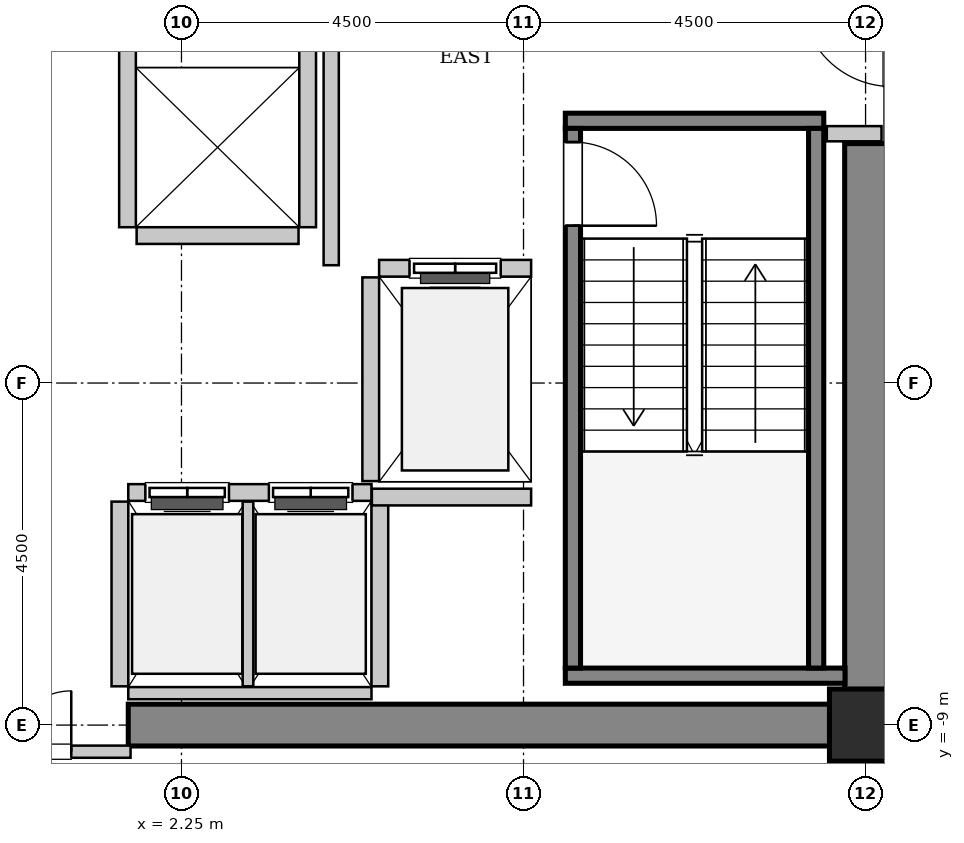
"""IFC4 building model, lengths in metres.
Left out: names, types, materials, properties, quantities, classifications, styles, units other than length and angle.
Written with IfcOpenShell. Run it as: python <this file> out.ifc"""

import sys

from ifc_helpers import new_model, si_unit, direction, frame, frame_2d, origin, origin_2d, place, context, subcontext, project, spatial, rectangle, hollow_rectangle, extrude, source, transform, mapped, element, fill, save


model = new_model("IFC4")
c1 = context("Model", 3, precision=1e-05, world=origin(), true_north=direction((0.0, 1.0)))
c2 = subcontext(c1, "Body", "Model", "MODEL_VIEW")
j1 = project(units=[si_unit("LENGTHUNIT", "METRE"), si_unit("PLANEANGLEUNIT", "RADIAN")], contexts=[c1])
p1 = place(None, origin())
s1 = spatial("IfcSite", under=j1, at=p1, CompositionType="ELEMENT")
p2 = place(p1, origin())
s2 = spatial("IfcBuilding", under=s1, at=p2, CompositionType="ELEMENT")
p3 = place(p2, frame((0.0, 0.0, 175.4)))
s3 = spatial("IfcBuildingStorey", under=s2, at=p3, CompositionType="ELEMENT", Elevation=175.4)
m1 = source(origin(), c2, "Body", "SweptSolid", [
    extrude(rectangle(XDim=9.975, YDim=0.55, at=frame_2d((4.987, 0.0))), origin(), (0.0, 0.0, 1.0), 3.8),
])
p4 = place(p3, frame((1.55, -9.0, 0.0), z_axis=(0.0, 0.0, 1.0), x_axis=(1.0, 0.0, 0.0)))
e1 = element("IfcWall", 1, at=p4, inside=s3, PredefinedType="SHEAR", context=c2, shape_type="MappedRepresentation", body=[
    mapped(m1, transform((0.0, 0.0, 0.0), x_axis=(1.0, 0.0, 0.0), y_axis=(0.0, 1.0, 0.0), z_axis=(0.0, 0.0, 1.0), scale=1.0)),
])
m2 = source(origin(), c2, "Body", "SweptSolid", [
    extrude(rectangle(XDim=7.375, YDim=0.55, at=frame_2d((3.688, 0.0))), origin(), (0.0, 0.0, 1.0), 3.8),
])
p5 = place(p3, frame((11.25, -8.725, 0.0), z_axis=(0.0, 0.0, 1.0), x_axis=(0.0, 1.0, 0.0)))
e2 = element("IfcWall", 2, at=p5, inside=s3, PredefinedType="SHEAR", context=c2, shape_type="MappedRepresentation", body=[
    mapped(m2, transform((0.0, 0.0, 0.0), x_axis=(1.0, 0.0, 0.0), y_axis=(0.0, 1.0, 0.0), z_axis=(0.0, 0.0, 1.0), scale=1.0)),
])
m3 = source(origin(), c2, "Body", "SweptSolid", [
    extrude(hollow_rectangle(XDim=0.95, YDim=0.95, WallThickness=0.045, InnerFilletRadius=0.045, OuterFilletRadius=0.09, at=origin_2d()), origin(), (0.0, 0.0, 1.0), 3.8),
])
p6 = place(p3, frame((11.25, -9.0, 0.0), z_axis=(0.0, 0.0, 1.0), x_axis=(1.0, 0.0, 0.0)))
e3 = element("IfcColumn", 3, at=p6, inside=s3, PredefinedType="COLUMN", context=c2, shape_type="MappedRepresentation", body=[
    mapped(m3, transform((0.0, 0.0, 0.0), x_axis=(1.0, 0.0, 0.0), y_axis=(0.0, 1.0, 0.0), z_axis=(0.0, 0.0, 1.0), scale=1.0)),
])
m4 = source(origin(), c2, "Body", "SweptSolid", [
    extrude(rectangle(XDim=3.4, YDim=0.2, at=frame_2d((1.7, 0.0))), origin(), (0.0, 0.0, 1.0), 3.8),
])
p7 = place(p3, frame((7.3, -1.05, 0.0), z_axis=(0.0, 0.0, 1.0), x_axis=(1.0, 0.0, 0.0)))
e4 = element("IfcWall", 4, at=p7, inside=s3, PredefinedType="SOLIDWALL", context=c2, shape_type="MappedRepresentation", body=[
    mapped(m4, transform((0.0, 0.0, 0.0), x_axis=(1.0, 0.0, 0.0), y_axis=(0.0, 1.0, 0.0), z_axis=(0.0, 0.0, 1.0), scale=1.0)),
])
m5 = source(origin(), c2, "Body", "SweptSolid", [
    extrude(rectangle(XDim=3.68, YDim=0.2, at=frame_2d((1.84, 0.0))), origin(), (0.0, 0.0, 1.0), 3.8),
])
p8 = place(p3, frame((7.3, -8.35, 0.0), z_axis=(0.0, 0.0, 1.0), x_axis=(1.0, 0.0, 0.0)))
e5 = element("IfcWall", 5, at=p8, inside=s3, PredefinedType="SOLIDWALL", context=c2, shape_type="MappedRepresentation", body=[
    mapped(m5, transform((0.0, 0.0, 0.0), x_axis=(1.0, 0.0, 0.0), y_axis=(0.0, 1.0, 0.0), z_axis=(0.0, 0.0, 1.0), scale=1.0)),
])
m6 = source(origin(), c2, "Body", "SweptSolid", [
    extrude(rectangle(XDim=7.1, YDim=0.2, at=frame_2d((3.55, 0.0))), origin(), (0.0, 0.0, 1.0), 3.8),
])
p9 = place(p3, frame((7.4, -1.15, 0.0), z_axis=(0.0, 0.0, 1.0), x_axis=(0.0, -1.0, 0.0)))
e6 = element("IfcWall", 6, at=p9, inside=s3, PredefinedType="SOLIDWALL", context=c2, shape_type="MappedRepresentation", body=[
    mapped(m6, transform((0.0, 0.0, 0.0), x_axis=(1.0, 0.0, 0.0), y_axis=(0.0, 1.0, 0.0), z_axis=(0.0, 0.0, 1.0), scale=1.0)),
])
p10 = place(p9, frame((0.18, 0.0, 0.0)))
e7 = element("IfcOpeningElement", 7, at=p10, cuts=e6, PredefinedType="OPENING", context=c2, shape_type="SweptSolid", body=[
    extrude(rectangle(XDim=1.1, YDim=2.15, at=frame_2d((0.55, 1.075))), frame((0.0, 0.11, 0.0), z_axis=(0.0, -1.0, 0.0), x_axis=(1.0, 0.0, 0.0)), (0.0, 0.0, 1.0), 0.22),
])
p11 = place(p3, frame((10.6, -1.15, 0.0), z_axis=(0.0, 0.0, 1.0), x_axis=(0.0, -1.0, 0.0)))
e8 = element("IfcWall", 8, at=p11, inside=s3, PredefinedType="SOLIDWALL", context=c2, shape_type="MappedRepresentation", body=[
    mapped(m6, transform((0.0, 0.0, 0.0), x_axis=(1.0, 0.0, 0.0), y_axis=(0.0, 1.0, 0.0), z_axis=(0.0, 0.0, 1.0), scale=1.0)),
])
m7 = source(origin(), c2, "Body", "SweptSolid", [
    extrude(rectangle(XDim=2.0, YDim=0.22, at=frame_2d((1.0, 0.0))), origin(), (0.0, 0.0, 1.0), 3.535),
])
p12 = place(p3, frame((6.85, -2.99, 0.0), z_axis=(0.0, 0.0, 1.0), x_axis=(-1.0, 0.0, 0.0)))
e9 = element("IfcWall", 9, at=p12, inside=s3, PredefinedType="SOLIDWALL", context=c2, shape_type="MappedRepresentation", body=[
    mapped(m7, transform((0.0, 0.0, 0.0), x_axis=(1.0, 0.0, 0.0), y_axis=(0.0, 1.0, 0.0), z_axis=(0.0, 0.0, 1.0), scale=1.0)),
])
p13 = place(p12, frame((0.4, 0.0, 0.0)))
e10 = element("IfcOpeningElement", 10, at=p13, cuts=e9, PredefinedType="OPENING", context=c2, shape_type="SweptSolid", body=[
    extrude(rectangle(XDim=1.2, YDim=2.2, at=frame_2d((0.6, 1.1))), frame((0.0, 0.12, 0.0), z_axis=(0.0, -1.0, 0.0), x_axis=(1.0, 0.0, 0.0)), (0.0, 0.0, 1.0), 0.24),
])
m8 = source(origin(), c2, "Body", "SweptSolid", [
    extrude(rectangle(XDim=2.68, YDim=0.22, at=frame_2d((1.34, 0.0))), origin(), (0.0, 0.0, 1.0), 3.535),
])
p14 = place(p3, frame((4.74, -3.11, 0.0), z_axis=(0.0, 0.0, 1.0), x_axis=(0.0, -1.0, 0.0)))
e11 = element("IfcWall", 11, at=p14, inside=s3, PredefinedType="SOLIDWALL", context=c2, shape_type="MappedRepresentation", body=[
    mapped(m8, transform((0.0, 0.0, 0.0), x_axis=(1.0, 0.0, 0.0), y_axis=(0.0, 1.0, 0.0), z_axis=(0.0, 0.0, 1.0), scale=1.0)),
])
m9 = source(origin(), c2, "Body", "SweptSolid", [
    extrude(rectangle(XDim=3.2, YDim=0.22, at=frame_2d((1.6, 0.0))), origin(), (0.0, 0.0, 1.0), 3.535),
])
p15 = place(p3, frame((4.75, -5.94, 0.0), z_axis=(0.0, 0.0, 1.0), x_axis=(-1.0, 0.0, 0.0)))
e12 = element("IfcWall", 12, at=p15, inside=s3, PredefinedType="SOLIDWALL", context=c2, shape_type="MappedRepresentation", body=[
    mapped(m9, transform((0.0, 0.0, 0.0), x_axis=(1.0, 0.0, 0.0), y_axis=(0.0, 1.0, 0.0), z_axis=(0.0, 0.0, 1.0), scale=1.0)),
])
p16 = place(p15, frame((1.875, 0.0, 0.0)))
e13 = element("IfcOpeningElement", 13, at=p16, cuts=e12, PredefinedType="OPENING", context=c2, shape_type="SweptSolid", body=[
    extrude(rectangle(XDim=1.1, YDim=2.2, at=frame_2d((0.55, 1.1))), frame((0.0, 0.12, 0.0), z_axis=(0.0, -1.0, 0.0), x_axis=(1.0, 0.0, 0.0)), (0.0, 0.0, 1.0), 0.24),
])
p17 = place(p15, frame((0.25, 0.0, 0.0)))
e14 = element("IfcOpeningElement", 14, at=p17, cuts=e12, PredefinedType="OPENING", context=c2, shape_type="SweptSolid", body=[
    extrude(rectangle(XDim=1.1, YDim=2.2, at=frame_2d((0.55, 1.1))), frame((0.0, 0.12, 0.0), z_axis=(0.0, -1.0, 0.0), x_axis=(1.0, 0.0, 0.0)), (0.0, 0.0, 1.0), 0.24),
])
m10 = source(origin(), c2, "Body", "SweptSolid", [
    extrude(rectangle(XDim=3.2, YDim=0.16, at=frame_2d((1.6, 0.0))), origin(), (0.0, 0.0, 1.0), 2.425),
])
p18 = place(p3, frame((1.55, -8.58, 0.0), z_axis=(0.0, 0.0, 1.0), x_axis=(1.0, 0.0, 0.0)))
e15 = element("IfcWall", 15, at=p18, inside=s3, PredefinedType="PARTITIONING", context=c2, shape_type="MappedRepresentation", body=[
    mapped(m10, transform((0.0, 0.0, 0.0), x_axis=(1.0, 0.0, 0.0), y_axis=(0.0, 1.0, 0.0), z_axis=(0.0, 0.0, 1.0), scale=1.0)),
])
m11 = source(origin(), c2, "Body", "SweptSolid", [
    extrude(rectangle(XDim=2.43, YDim=0.22, at=frame_2d((1.215, 0.0))), origin(), (0.0, 0.0, 1.0), 3.535),
])
p19 = place(p3, frame((1.44, -6.06, 0.0), z_axis=(0.0, 0.0, 1.0), x_axis=(0.0, -1.0, 0.0)))
e16 = element("IfcWall", 16, at=p19, inside=s3, PredefinedType="SOLIDWALL", context=c2, shape_type="MappedRepresentation", body=[
    mapped(m11, transform((0.0, 0.0, 0.0), x_axis=(1.0, 0.0, 0.0), y_axis=(0.0, 1.0, 0.0), z_axis=(0.0, 0.0, 1.0), scale=1.0)),
])
m12 = source(origin(), c2, "Body", "SweptSolid", [
    extrude(rectangle(XDim=2.43, YDim=0.14, at=frame_2d((1.215, 0.0))), origin(), (0.0, 0.0, 1.0), 3.535),
])
p20 = place(p3, frame((3.125, -8.49, 0.0), z_axis=(0.0, 0.0, 1.0), x_axis=(0.0, 1.0, 0.0)))
e17 = element("IfcWall", 17, at=p20, inside=s3, PredefinedType="PARTITIONING", context=c2, shape_type="MappedRepresentation", body=[
    mapped(m12, transform((0.0, 0.0, 0.0), x_axis=(1.0, 0.0, 0.0), y_axis=(0.0, 1.0, 0.0), z_axis=(0.0, 0.0, 1.0), scale=1.0)),
])
p21 = place(p3, frame((4.86, -8.49, 0.0), z_axis=(0.0, 0.0, 1.0), x_axis=(0.0, 1.0, 0.0)))
e18 = element("IfcWall", 18, at=p21, inside=s3, PredefinedType="SOLIDWALL", context=c2, shape_type="MappedRepresentation", body=[
    mapped(m11, transform((0.0, 0.0, 0.0), x_axis=(1.0, 0.0, 0.0), y_axis=(0.0, 1.0, 0.0), z_axis=(0.0, 0.0, 1.0), scale=1.0)),
])
m13 = source(origin(), c2, "Body", "SweptSolid", [
    extrude(rectangle(XDim=4.9, YDim=0.22, at=frame_2d((2.45, 0.0))), origin(), (0.0, 0.0, 1.0), 3.535),
])
for number, where, z_axis, x_axis in (
    (19, (1.54, 2.45, 0.0), (0.0, 0.0, 1.0), (0.0, -1.0, 0.0)),
    (20, (3.91, -2.45, 0.0), (0.0, 0.0, 1.0), (0.0, 1.0, 0.0)),
):
    element("IfcWall", number, at=place(p3, frame(where, z_axis=z_axis, x_axis=x_axis)), inside=s3, PredefinedType="SOLIDWALL", context=c2, shape_type="MappedRepresentation", body=[
        mapped(m13, transform((0.0, 0.0, 0.0), x_axis=(1.0, 0.0, 0.0), y_axis=(0.0, 1.0, 0.0), z_axis=(0.0, 0.0, 1.0), scale=1.0)),
    ])
m14 = source(origin(), c2, "Body", "SweptSolid", [
    extrude(rectangle(XDim=2.13, YDim=0.22, at=frame_2d((1.065, 0.0))), origin(), (0.0, 0.0, 1.0), 3.535),
])
p22 = place(p3, frame((1.66, -2.56, 0.0), z_axis=(0.0, 0.0, 1.0), x_axis=(1.0, 0.0, 0.0)))
e21 = element("IfcWall", 21, at=p22, inside=s3, PredefinedType="SOLIDWALL", context=c2, shape_type="MappedRepresentation", body=[
    mapped(m14, transform((0.0, 0.0, 0.0), x_axis=(1.0, 0.0, 0.0), y_axis=(0.0, 1.0, 0.0), z_axis=(0.0, 0.0, 1.0), scale=1.0)),
])
m15 = source(origin(), c2, "Body", "SweptSolid", [
    extrude(rectangle(XDim=2.095, YDim=0.22, at=frame_2d((1.048, 0.0))), origin(), (0.0, 0.0, 1.0), 3.535),
])
p23 = place(p3, frame((4.755, -6.0, 0.0), z_axis=(0.0, 0.0, 1.0), x_axis=(1.0, 0.0, 0.0)))
e22 = element("IfcWall", 22, at=p23, inside=s3, PredefinedType="SOLIDWALL", context=c2, shape_type="MappedRepresentation", body=[
    mapped(m15, transform((0.0, 0.0, 0.0), x_axis=(1.0, 0.0, 0.0), y_axis=(0.0, 1.0, 0.0), z_axis=(0.0, 0.0, 1.0), scale=1.0)),
])
m16 = source(origin(), c2, "Body", "SweptSolid", [
    extrude(rectangle(XDim=5.9, YDim=0.2, at=frame_2d((2.95, 0.0))), origin(), (0.0, 0.0, 1.0), 3.535),
])
p24 = place(p3, frame((4.22, -2.95, 0.0), z_axis=(0.0, 0.0, 1.0), x_axis=(0.0, 1.0, 0.0)))
e23 = element("IfcWall", 23, at=p24, inside=s3, PredefinedType="PARTITIONING", context=c2, shape_type="MappedRepresentation", body=[
    mapped(m16, transform((0.0, 0.0, 0.0), x_axis=(1.0, 0.0, 0.0), y_axis=(0.0, 1.0, 0.0), z_axis=(0.0, 0.0, 1.0), scale=1.0)),
])
m17 = source(origin(), c2, "Body", "SweptSolid", [
    extrude(rectangle(XDim=0.72, YDim=0.2, at=frame_2d((0.36, 0.0))), origin(), (0.0, 0.0, 1.0), 3.535),
])
p25 = place(p3, frame((10.74, -1.22, 0.0), z_axis=(0.0, 0.0, 1.0), x_axis=(1.0, 0.0, 0.0)))
e24 = element("IfcWall", 24, at=p25, inside=s3, PredefinedType="PARTITIONING", context=c2, shape_type="MappedRepresentation", body=[
    mapped(m17, transform((0.0, 0.0, 0.0), x_axis=(1.0, 0.0, 0.0), y_axis=(0.0, 1.0, 0.0), z_axis=(0.0, 0.0, 1.0), scale=1.0)),
])
m18 = source(origin(), c2, "Body", "SweptSolid", [
    extrude(rectangle(XDim=3.16, YDim=0.16, at=frame_2d((1.58, 0.0))), origin(), (0.0, 0.0, 1.0), 2.425),
])
p26 = place(p3, frame((-1.58, -9.35, 0.0), z_axis=(0.0, 0.0, 1.0), x_axis=(1.0, 0.0, 0.0)))
e25 = element("IfcWall", 25, at=p26, inside=s3, PredefinedType="PARTITIONING", context=c2, shape_type="MappedRepresentation", body=[
    mapped(m18, transform((0.0, 0.0, 0.0), x_axis=(1.0, 0.0, 0.0), y_axis=(0.0, 1.0, 0.0), z_axis=(0.0, 0.0, 1.0), scale=1.0)),
])
p27 = place(p26, frame((0.78, 0.0, 0.0)))
e26 = element("IfcOpeningElement", 26, at=p27, cuts=e25, PredefinedType="OPENING", context=c2, shape_type="SweptSolid", body=[
    extrude(rectangle(XDim=1.6, YDim=2.3, at=frame_2d((0.8, 1.15))), frame((0.0, 0.09, 0.0), z_axis=(0.0, -1.0, 0.0), x_axis=(1.0, 0.0, 0.0)), (0.0, 0.0, 1.0), 0.18),
])
m19 = source(origin(), c2, "Body", "SweptSolid", [
    extrude(rectangle(XDim=1.1, YDim=2.15, at=frame_2d((0.55, 1.075))), frame((0.0, 0.025, 0.0), z_axis=(0.0, -1.0, 0.0), x_axis=(1.0, 0.0, 0.0)), (0.0, 0.0, 1.0), 0.05),
])
p28 = place(p10, origin())
e27 = element("IfcDoor", 27, at=p28, inside=s3, OperationType="SINGLE_SWING_RIGHT", PredefinedType="DOOR", context=c2, shape_type="MappedRepresentation", body=[
    mapped(m19, transform((0.0, 0.0, 0.0), x_axis=(1.0, 0.0, 0.0), y_axis=(0.0, 1.0, 0.0), z_axis=(0.0, 0.0, 1.0), scale=1.0)),
])
fill(e7, e27)
m20 = source(origin(), c2, "Body", "SweptSolid", [
    extrude(rectangle(XDim=1.2, YDim=2.2, at=frame_2d((0.6, 1.1))), frame((0.0, 0.025, 0.0), z_axis=(0.0, -1.0, 0.0), x_axis=(1.0, 0.0, 0.0)), (0.0, 0.0, 1.0), 0.05),
])
p29 = place(p13, origin())
e28 = element("IfcDoor", 28, at=p29, inside=s3, OperationType="SLIDING_TO_LEFT", PredefinedType="DOOR", context=c2, shape_type="MappedRepresentation", body=[
    mapped(m20, transform((0.0, 0.0, 0.0), x_axis=(1.0, 0.0, 0.0), y_axis=(0.0, 1.0, 0.0), z_axis=(0.0, 0.0, 1.0), scale=1.0)),
])
fill(e10, e28)
m21 = source(origin(), c2, "Body", "SweptSolid", [
    extrude(rectangle(XDim=1.1, YDim=2.2, at=frame_2d((0.55, 1.1))), frame((0.0, 0.025, 0.0), z_axis=(0.0, -1.0, 0.0), x_axis=(1.0, 0.0, 0.0)), (0.0, 0.0, 1.0), 0.05),
])
p30 = place(p16, origin())
e29 = element("IfcDoor", 29, at=p30, inside=s3, OperationType="DOUBLE_DOOR_SLIDING", PredefinedType="DOOR", context=c2, shape_type="MappedRepresentation", body=[
    mapped(m21, transform((0.0, 0.0, 0.0), x_axis=(1.0, 0.0, 0.0), y_axis=(0.0, 1.0, 0.0), z_axis=(0.0, 0.0, 1.0), scale=1.0)),
])
fill(e13, e29)
p31 = place(p17, origin())
e30 = element("IfcDoor", 30, at=p31, inside=s3, OperationType="DOUBLE_DOOR_SLIDING", PredefinedType="DOOR", context=c2, shape_type="MappedRepresentation", body=[
    mapped(m21, transform((0.0, 0.0, 0.0), x_axis=(1.0, 0.0, 0.0), y_axis=(0.0, 1.0, 0.0), z_axis=(0.0, 0.0, 1.0), scale=1.0)),
])
fill(e14, e30)
m22 = source(origin(), c2, "Body", "SweptSolid", [
    extrude(rectangle(XDim=1.6, YDim=2.3, at=frame_2d((0.8, 1.15))), frame((0.0, 0.025, 0.0), z_axis=(0.0, -1.0, 0.0), x_axis=(1.0, 0.0, 0.0)), (0.0, 0.0, 1.0), 0.05),
])
p32 = place(p27, origin())
e31 = element("IfcDoor", 31, at=p32, inside=s3, OperationType="DOUBLE_DOOR_SINGLE_SWING", PredefinedType="DOOR", context=c2, shape_type="MappedRepresentation", body=[
    mapped(m22, transform((0.0, 0.0, 0.0), x_axis=(1.0, 0.0, 0.0), y_axis=(0.0, 1.0, 0.0), z_axis=(0.0, 0.0, 1.0), scale=1.0)),
])
fill(e26, e31)
save(model, sys.argv[1])
